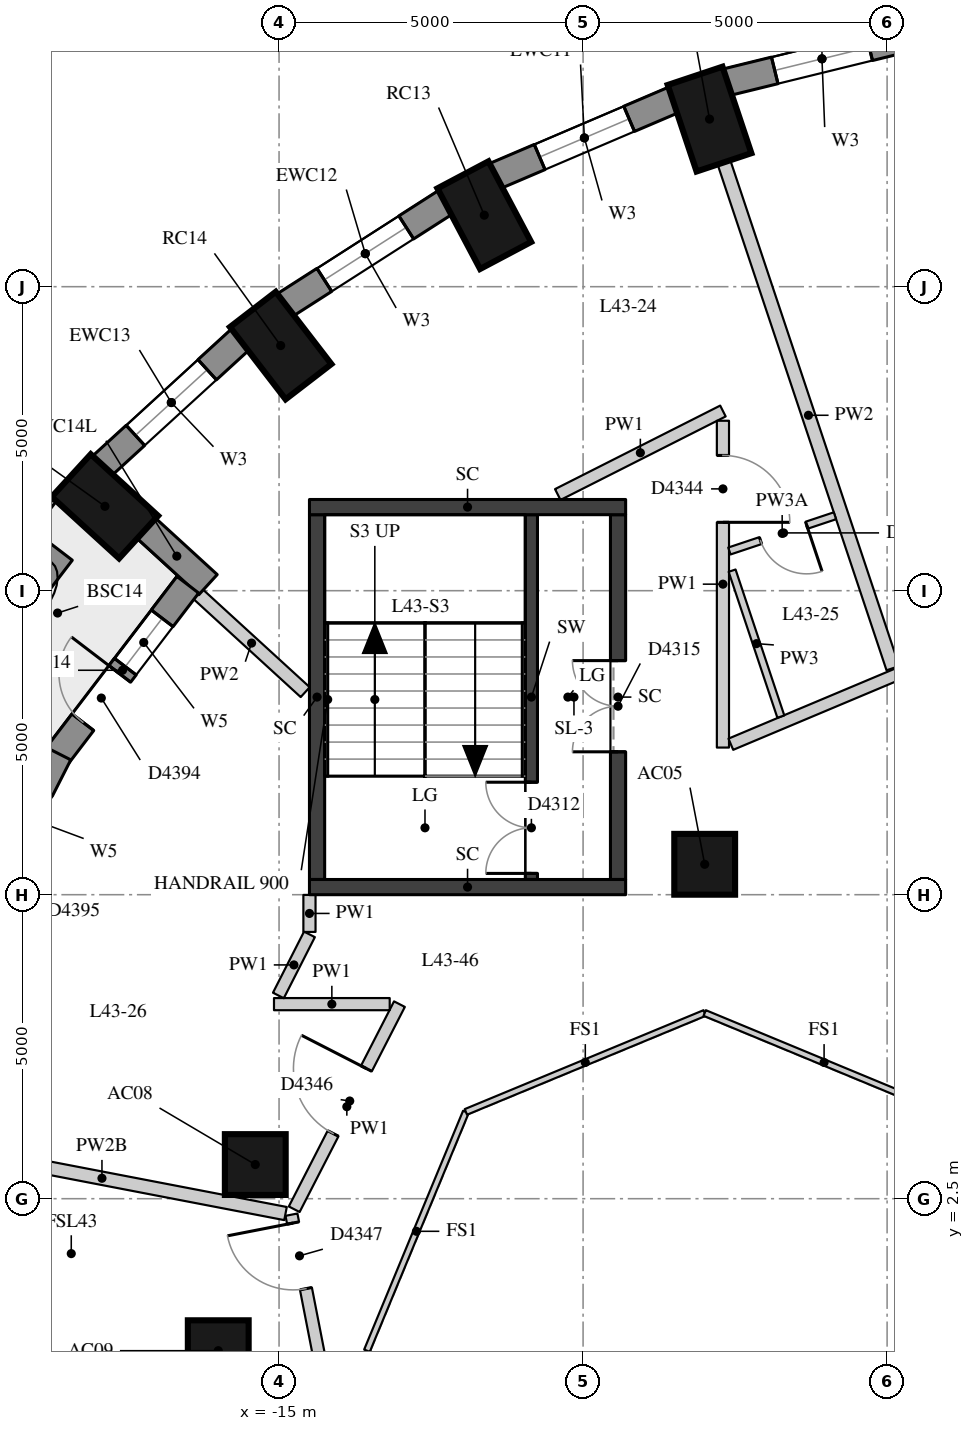
"""IFC4 building model, lengths in metres.
Left out: names, types, materials, properties, quantities, classifications, styles, units other than length and angle.
Written with IfcOpenShell. Run it as: python <this file> out.ifc"""

import sys

from ifc_helpers import new_model, si_unit, direction, frame, frame_2d, origin, origin_2d, place, context, subcontext, project, spatial, rectangle, extrude, element, fill, save


model = new_model("IFC4")
c1 = context("Model", 3, precision=1e-05, world=origin(), true_north=direction((0.0, 1.0)))
c2 = subcontext(c1, "Body", "Model", "MODEL_VIEW")
j1 = project(units=[si_unit("LENGTHUNIT", "METRE"), si_unit("PLANEANGLEUNIT", "RADIAN")], contexts=[c1])
p1 = place(None, origin())
s1 = spatial("IfcSite", under=j1, at=p1, CompositionType="ELEMENT")
p2 = place(p1, origin())
s2 = spatial("IfcBuilding", under=s1, at=p2, CompositionType="ELEMENT")
p3 = place(p2, frame((0.0, 0.0, 155.0)))
s3 = spatial("IfcBuildingStorey", under=s2, at=p3, CompositionType="ELEMENT", Elevation=155.0)
for number, where, z_axis, x_axis in (
    (1, (-7.92, 20.256, 0.0), (0.0, 0.0, 1.0), (-0.317, 0.949, 0.0)),
    (2, (-11.625, 18.676, 0.0), (0.0, 0.0, 1.0), (-0.468, 0.884, 0.0)),
    (3, (-14.973, 16.532, 0.0), (0.0, 0.0, 1.0), (-0.61, 0.792, 0.0)),
    (4, (-17.864, 13.888, 0.0), (0.0, 0.0, 1.0), (-0.738, 0.675, 0.0)),
):
    element("IfcColumn", number, at=place(p3, frame(where, z_axis=z_axis, x_axis=x_axis)), inside=s3, PredefinedType="COLUMN", context=c2, shape_type="SweptSolid", body=[
        extrude(rectangle(XDim=1.5, YDim=0.95, at=origin_2d()), origin(), (0.0, 0.0, 1.0), 3.3),
    ])
for number, where, z_axis, x_axis in (
    (5, (-8.0, 8.0, 0.0), (0.0, 0.0, 1.0), (1.0, 0.0, 0.0)),
    (6, (-15.391, 3.062, 0.0), (0.0, 0.0, 1.0), (1.0, 0.0, 0.0)),
    (7, (-16.0, 0.0, 0.0), (0.0, 0.0, 1.0), (1.0, 0.0, 0.0)),
):
    element("IfcColumn", number, at=place(p3, frame(where, z_axis=z_axis, x_axis=x_axis)), inside=s3, PredefinedType="COLUMN", context=c2, shape_type="SweptSolid", body=[
        extrude(rectangle(XDim=1.0, YDim=1.0, at=origin_2d()), origin(), (0.0, 0.0, 1.0), 3.3),
    ])
p4 = place(p3, frame((-4.499, 21.633, 0.0), z_axis=(0.0, 0.0, 1.0), x_axis=(-0.971232901476, -0.238131583563, 0.0)))
e8 = element("IfcWall", 8, at=p4, inside=s3, PredefinedType="SOLIDWALL", context=c2, shape_type="SweptSolid", body=[
    extrude(rectangle(XDim=3.237, YDim=0.45, at=frame_2d((1.618, 0.0))), origin(), (0.0, 0.0, 1.0), 3.02),
])
p5 = place(p4, frame((0.818, 0.0, 0.4)))
e9 = element("IfcOpeningElement", 9, at=p5, cuts=e8, PredefinedType="OPENING", context=c2, shape_type="SweptSolid", body=[
    extrude(rectangle(XDim=1.6, YDim=1.75, at=frame_2d((0.8, 0.875))), frame((0.0, 0.235, 0.0), z_axis=(0.0, -1.0, 0.0), x_axis=(1.0, 0.0, 0.0)), (0.0, 0.0, 1.0), 0.47),
])
p6 = place(p3, frame((-8.506, 20.574, 0.0), z_axis=(0.0, 0.0, 1.0), x_axis=(-0.919798725687, -0.392390499663, 0.0)))
e10 = element("IfcWall", 10, at=p6, inside=s3, PredefinedType="SOLIDWALL", context=c2, shape_type="SweptSolid", body=[
    extrude(rectangle(XDim=3.2, YDim=0.45, at=frame_2d((1.6, 0.0))), origin(), (0.0, 0.0, 1.0), 3.02),
])
p7 = place(p6, frame((0.8, 0.0, 0.4)))
e11 = element("IfcOpeningElement", 11, at=p7, cuts=e10, PredefinedType="OPENING", context=c2, shape_type="SweptSolid", body=[
    extrude(rectangle(XDim=1.6, YDim=1.75, at=frame_2d((0.8, 0.875))), frame((0.0, 0.235, 0.0), z_axis=(0.0, -1.0, 0.0), x_axis=(1.0, 0.0, 0.0)), (0.0, 0.0, 1.0), 0.47),
])
p8 = place(p3, frame((-12.255, 18.893, 0.0), z_axis=(0.0, 0.0, 1.0), x_axis=(-0.842030726237, -0.539429565442, 0.0)))
e12 = element("IfcWall", 12, at=p8, inside=s3, PredefinedType="SOLIDWALL", context=c2, shape_type="SweptSolid", body=[
    extrude(rectangle(XDim=3.151, YDim=0.45, at=frame_2d((1.576, 0.0))), origin(), (0.0, 0.0, 1.0), 3.02),
])
p9 = place(p8, frame((0.776, 0.0, 0.4)))
e13 = element("IfcOpeningElement", 13, at=p9, cuts=e12, PredefinedType="OPENING", context=c2, shape_type="SweptSolid", body=[
    extrude(rectangle(XDim=1.6, YDim=1.75, at=frame_2d((0.8, 0.875))), frame((0.0, 0.235, 0.0), z_axis=(0.0, -1.0, 0.0), x_axis=(1.0, 0.0, 0.0)), (0.0, 0.0, 1.0), 0.47),
])
p10 = place(p3, frame((-15.63, 16.639, 0.0), z_axis=(0.0, 0.0, 1.0), x_axis=(-0.737808755941, -0.675009807082, 0.0)))
e14 = element("IfcWall", 14, at=p10, inside=s3, PredefinedType="SOLIDWALL", context=c2, shape_type="SweptSolid", body=[
    extrude(rectangle(XDim=3.094, YDim=0.45, at=frame_2d((1.547, 0.0))), origin(), (0.0, 0.0, 1.0), 3.02),
])
p11 = place(p10, frame((0.747, 0.0, 0.4)))
e15 = element("IfcOpeningElement", 15, at=p11, cuts=e14, PredefinedType="OPENING", context=c2, shape_type="SweptSolid", body=[
    extrude(rectangle(XDim=1.6, YDim=1.75, at=frame_2d((0.8, 0.875))), frame((0.0, 0.235, 0.0), z_axis=(0.0, -1.0, 0.0), x_axis=(1.0, 0.0, 0.0)), (0.0, 0.0, 1.0), 0.47),
])
p12 = place(p3, frame((-17.195, 13.537, 0.0), z_axis=(0.0, 0.0, 1.0), x_axis=(0.737918885826, -0.674889411638, 0.0)))
e16 = element("IfcWall", 16, at=p12, inside=s3, PredefinedType="SOLIDWALL", context=c2, shape_type="SweptSolid", body=[
    extrude(rectangle(XDim=1.391, YDim=0.45, at=frame_2d((0.695, 0.0))), origin(), (0.0, 0.0, 1.0), 3.02),
])
p13 = place(p3, frame((-16.501, 12.598, 0.0), z_axis=(0.0, 0.0, 1.0), x_axis=(-0.606778881252, -0.794870674554, 0.0)))
e17 = element("IfcWall", 17, at=p13, inside=s3, PredefinedType="SOLIDWALL", context=c2, shape_type="SweptSolid", body=[
    extrude(rectangle(XDim=3.538, YDim=0.45, at=frame_2d((1.769, 0.0))), origin(), (0.0, 0.0, 1.0), 3.02),
])
p14 = place(p13, frame((0.694, 0.0, 0.4)))
e18 = element("IfcOpeningElement", 18, at=p14, cuts=e17, PredefinedType="OPENING", context=c2, shape_type="SweptSolid", body=[
    extrude(rectangle(XDim=1.0, YDim=1.75, at=frame_2d((0.5, 0.875))), frame((0.0, 0.235, 0.0), z_axis=(0.0, -1.0, 0.0), x_axis=(1.0, 0.0, 0.0)), (0.0, 0.0, 1.0), 0.47),
])
p15 = place(p13, frame((1.844, 0.0, 0.0)))
e19 = element("IfcOpeningElement", 19, at=p15, cuts=e17, PredefinedType="OPENING", context=c2, shape_type="SweptSolid", body=[
    extrude(rectangle(XDim=1.0, YDim=2.15, at=frame_2d((0.5, 1.075))), frame((0.0, 0.235, 0.0), z_axis=(0.0, -1.0, 0.0), x_axis=(1.0, 0.0, 0.0)), (0.0, 0.0, 1.0), 0.47),
])
p16 = place(p3, frame((-18.626, 9.82, 0.0), z_axis=(0.0, 0.0, 1.0), x_axis=(-0.453241970186, -0.891387523169, 0.0)))
e20 = element("IfcWall", 20, at=p16, inside=s3, PredefinedType="SOLIDWALL", context=c2, shape_type="SweptSolid", body=[
    extrude(rectangle(XDim=3.493, YDim=0.45, at=frame_2d((1.747, 0.0))), origin(), (0.0, 0.0, 1.0), 3.02),
])
p17 = place(p16, frame((0.672, 0.0, 0.4)))
e21 = element("IfcOpeningElement", 21, at=p17, cuts=e20, PredefinedType="OPENING", context=c2, shape_type="SweptSolid", body=[
    extrude(rectangle(XDim=1.0, YDim=1.75, at=frame_2d((0.5, 0.875))), frame((0.0, 0.235, 0.0), z_axis=(0.0, -1.0, 0.0), x_axis=(1.0, 0.0, 0.0)), (0.0, 0.0, 1.0), 0.47),
])
p18 = place(p16, frame((1.822, 0.0, 0.0)))
e22 = element("IfcOpeningElement", 22, at=p18, cuts=e20, PredefinedType="OPENING", context=c2, shape_type="SweptSolid", body=[
    extrude(rectangle(XDim=1.0, YDim=2.15, at=frame_2d((0.5, 1.075))), frame((0.0, 0.235, 0.0), z_axis=(0.0, -1.0, 0.0), x_axis=(1.0, 0.0, 0.0)), (0.0, 0.0, 1.0), 0.47),
])
p19 = place(p3, frame((-18.678, 13.214, 0.0), z_axis=(0.0, 0.0, 1.0), x_axis=(-0.607762189494, -0.794119084912, 0.0)))
e23 = element("IfcWall", 23, at=p19, inside=s3, PredefinedType="USERDEFINED", context=c2, shape_type="SweptSolid", body=[
    extrude(rectangle(XDim=1.8, YDim=0.7, at=frame_2d((0.9, 0.0))), origin(), (0.0, 0.0, 1.0), 0.75),
])
p20 = place(p3, frame((-10.85, 7.75, 0.0), z_axis=(0.0, 0.0, 1.0), x_axis=(0.0, 1.0, 0.0)))
e24 = element("IfcWall", 24, at=p20, inside=s3, PredefinedType="SHEAR", context=c2, shape_type="SweptSolid", body=[
    extrude(rectangle(XDim=6.0, YDim=0.2, at=frame_2d((3.0, 0.0))), origin(), (0.0, 0.0, 1.0), 3.02),
])
p21 = place(p20, frame((0.1, 0.0, 0.0)))
e25 = element("IfcOpeningElement", 25, at=p21, cuts=e24, PredefinedType="OPENING", context=c2, shape_type="SweptSolid", body=[
    extrude(rectangle(XDim=1.5, YDim=2.1, at=frame_2d((0.75, 1.05))), frame((0.0, 0.11, 0.0), z_axis=(0.0, -1.0, 0.0), x_axis=(1.0, 0.0, 0.0)), (0.0, 0.0, 1.0), 0.22),
])
p22 = place(p3, frame((-14.375, 7.75, -0.28), z_axis=(0.0, 0.0, 1.0), x_axis=(0.0, 1.0, 0.0)))
e26 = element("IfcWall", 26, at=p22, inside=s3, PredefinedType="SHEAR", context=c2, shape_type="SweptSolid", body=[
    extrude(rectangle(XDim=6.0, YDim=0.25, at=frame_2d((3.0, 0.0))), origin(), (0.0, 0.0, 1.0), 3.3),
])
p23 = place(p3, frame((-9.425, 7.75, -0.28), z_axis=(0.0, 0.0, 1.0), x_axis=(0.0, 1.0, 0.0)))
e27 = element("IfcWall", 27, at=p23, inside=s3, PredefinedType="SHEAR", context=c2, shape_type="SweptSolid", body=[
    extrude(rectangle(XDim=6.0, YDim=0.25, at=frame_2d((3.0, 0.0))), origin(), (0.0, 0.0, 1.0), 3.3),
])
p24 = place(p23, frame((2.1, 0.0, 0.28)))
e28 = element("IfcOpeningElement", 28, at=p24, cuts=e27, PredefinedType="OPENING", context=c2, shape_type="SweptSolid", body=[
    extrude(rectangle(XDim=1.5, YDim=2.1, at=frame_2d((0.75, 1.05))), frame((0.0, 0.135, 0.0), z_axis=(0.0, -1.0, 0.0), x_axis=(1.0, 0.0, 0.0)), (0.0, 0.0, 1.0), 0.27),
])
for number, where, z_axis, x_axis in (
    (29, (-14.5, 13.875, -0.28), (0.0, 0.0, 1.0), (1.0, 0.0, 0.0)),
    (30, (-14.5, 7.625, -0.28), (0.0, 0.0, 1.0), (1.0, 0.0, 0.0)),
):
    element("IfcWall", number, at=place(p3, frame(where, z_axis=z_axis, x_axis=x_axis)), inside=s3, PredefinedType="SHEAR", context=c2, shape_type="SweptSolid", body=[
        extrude(rectangle(XDim=5.2, YDim=0.25, at=frame_2d((2.6, 0.0))), origin(), (0.0, 0.0, 1.0), 3.3),
    ])
p25 = place(p3, frame((-13.268, -5.583, 0.0), z_axis=(0.0, 0.0, 1.0), x_axis=(-0.191747927029, 0.981444207523, 0.0)))
e31 = element("IfcWall", 31, at=p25, inside=s3, PredefinedType="PARTITIONING", context=c2, shape_type="SweptSolid", body=[
    extrude(rectangle(XDim=7.968, YDim=0.2, at=frame_2d((3.984, 0.0))), origin(), (0.0, 0.0, 1.0), 3.02),
])
p26 = place(p25, frame((6.728, 0.0, 0.0)))
e32 = element("IfcOpeningElement", 32, at=p26, cuts=e31, PredefinedType="OPENING", context=c2, shape_type="SweptSolid", body=[
    extrude(rectangle(XDim=1.1, YDim=2.1, at=frame_2d((0.55, 1.05))), frame((0.0, 0.11, 0.0), z_axis=(0.0, -1.0, 0.0), x_axis=(1.0, 0.0, 0.0)), (0.0, 0.0, 1.0), 0.22),
])
p27 = place(p3, frame((-14.751, 2.326, 0.0), z_axis=(0.0, 0.0, 1.0), x_axis=(0.456461745611, 0.889743038632, 0.0)))
e33 = element("IfcWall", 33, at=p27, inside=s3, PredefinedType="PARTITIONING", context=c2, shape_type="SweptSolid", body=[
    extrude(rectangle(XDim=3.792, YDim=0.2, at=frame_2d((1.896, 0.0))), origin(), (0.0, 0.0, 1.0), 3.02),
])
p28 = place(p27, frame((1.401, 0.0, 0.0)))
e34 = element("IfcOpeningElement", 34, at=p28, cuts=e33, PredefinedType="OPENING", context=c2, shape_type="SweptSolid", body=[
    extrude(rectangle(XDim=1.2, YDim=2.1, at=frame_2d((0.6, 1.05))), frame((0.0, 0.11, 0.0), z_axis=(0.0, -1.0, 0.0), x_axis=(1.0, 0.0, 0.0)), (0.0, 0.0, 1.0), 0.22),
])
p29 = place(p3, frame((-13.18, 5.7, 0.0), z_axis=(0.0, 0.0, 1.0), x_axis=(-1.0, 0.0, 0.0)))
e35 = element("IfcWall", 35, at=p29, inside=s3, PredefinedType="PARTITIONING", context=c2, shape_type="SweptSolid", body=[
    extrude(rectangle(XDim=1.903, YDim=0.2, at=frame_2d((0.952, 0.0))), origin(), (0.0, 0.0, 1.0), 3.02),
])
p30 = place(p3, frame((-15.011, 5.843, 0.0), z_axis=(0.0, 0.0, 1.0), x_axis=(0.453267091839, 0.891374749169, 0.0)))
e36 = element("IfcWall", 36, at=p30, inside=s3, PredefinedType="PARTITIONING", context=c2, shape_type="SweptSolid", body=[
    extrude(rectangle(XDim=1.127, YDim=0.2, at=frame_2d((0.564, 0.0))), origin(), (0.0, 0.0, 1.0), 3.02),
])
p31 = place(p3, frame((-14.5, 6.887, 0.0), z_axis=(0.0, 0.0, 1.0), x_axis=(0.0, 1.0, 0.0)))
e37 = element("IfcWall", 37, at=p31, inside=s3, PredefinedType="PARTITIONING", context=c2, shape_type="SweptSolid", body=[
    extrude(rectangle(XDim=0.609, YDim=0.2, at=frame_2d((0.304, 0.0))), origin(), (0.0, 0.0, 1.0), 3.02),
])
p32 = place(p3, frame((-10.416, 14.082, 0.0), z_axis=(0.0, 0.0, 1.0), x_axis=(0.892396808139, 0.451251522793, 0.0)))
e38 = element("IfcWall", 38, at=p32, inside=s3, PredefinedType="PARTITIONING", context=c2, shape_type="SweptSolid", body=[
    extrude(rectangle(XDim=3.044, YDim=0.2, at=frame_2d((1.522, 0.0))), origin(), (0.0, 0.0, 1.0), 3.02),
])
p33 = place(p3, frame((-7.7, 15.295, 0.0), z_axis=(0.0, 0.0, 1.0), x_axis=(0.0, -1.0, 0.0)))
e39 = element("IfcWall", 39, at=p33, inside=s3, PredefinedType="PARTITIONING", context=c2, shape_type="SweptSolid", body=[
    extrude(rectangle(XDim=5.375, YDim=0.2, at=frame_2d((2.688, 0.0))), origin(), (0.0, 0.0, 1.0), 3.02),
])
p34 = place(p33, frame((0.57, 0.0, 0.0)))
e40 = element("IfcOpeningElement", 40, at=p34, cuts=e39, PredefinedType="OPENING", context=c2, shape_type="SweptSolid", body=[
    extrude(rectangle(XDim=1.1, YDim=2.1, at=frame_2d((0.55, 1.05))), frame((0.0, 0.11, 0.0), z_axis=(0.0, -1.0, 0.0), x_axis=(1.0, 0.0, 0.0)), (0.0, 0.0, 1.0), 0.22),
])
p35 = place(p3, frame((-7.57, 9.975, 0.0), z_axis=(0.0, 0.0, 1.0), x_axis=(0.921815879705, 0.387628022624, 0.0)))
e41 = element("IfcWall", 41, at=p35, inside=s3, PredefinedType="PARTITIONING", context=c2, shape_type="SweptSolid", body=[
    extrude(rectangle(XDim=8.321, YDim=0.2, at=frame_2d((4.16, 0.0))), origin(), (0.0, 0.0, 1.0), 3.02),
])
p36 = place(p35, frame((4.721, 0.0, 0.0)))
e42 = element("IfcOpeningElement", 42, at=p36, cuts=e41, PredefinedType="OPENING", context=c2, shape_type="SweptSolid", body=[
    extrude(rectangle(XDim=1.8, YDim=2.1, at=frame_2d((0.9, 1.05))), frame((0.0, 0.11, 0.0), z_axis=(0.0, -1.0, 0.0), x_axis=(1.0, 0.0, 0.0)), (0.0, 0.0, 1.0), 0.22),
])
p37 = place(p3, frame((-7.683, 19.545, 0.0), z_axis=(0.0, 0.0, 1.0), x_axis=(0.316703700313, -0.948524520615, 0.0)))
e43 = element("IfcWall", 43, at=p37, inside=s3, PredefinedType="PARTITIONING", context=c2, shape_type="SweptSolid", body=[
    extrude(rectangle(XDim=8.771, YDim=0.22, at=frame_2d((4.385, 0.0))), origin(), (0.0, 0.0, 1.0), 3.02),
])
p38 = place(p3, frame((-16.334, 12.445, 0.0), z_axis=(0.0, 0.0, 1.0), x_axis=(0.737857346278, -0.674956692347, 0.0)))
e44 = element("IfcWall", 44, at=p38, inside=s3, PredefinedType="PARTITIONING", context=c2, shape_type="SweptSolid", body=[
    extrude(rectangle(XDim=2.391, YDim=0.22, at=frame_2d((1.195, 0.0))), origin(), (0.0, 0.0, 1.0), 3.02),
])
p39 = place(p3, frame((-20.932, 3.417, 0.0), z_axis=(0.0, 0.0, 1.0), x_axis=(0.9820075798, -0.188841502892, 0.0)))
e45 = element("IfcWall", 45, at=p39, inside=s3, PredefinedType="PARTITIONING", context=c2, shape_type="SweptSolid", body=[
    extrude(rectangle(XDim=6.149, YDim=0.22, at=frame_2d((3.074, 0.0))), origin(), (0.0, 0.0, 1.0), 2.57),
])
p40 = place(p3, frame((-6.748, 10.429, 0.0), z_axis=(0.0, 0.0, 1.0), x_axis=(-0.316690754737, 0.948528842927, 0.0)))
e46 = element("IfcWall", 46, at=p40, inside=s3, PredefinedType="PARTITIONING", context=c2, shape_type="SweptSolid", body=[
    extrude(rectangle(XDim=2.531, YDim=0.12, at=frame_2d((1.266, 0.0))), origin(), (0.0, 0.0, 1.0), 3.02),
])
p41 = place(p3, frame((-7.594, 13.153, 0.0), z_axis=(0.0, 0.0, 1.0), x_axis=(0.948563158378, 0.316587957079, 0.0)))
e47 = element("IfcWall", 47, at=p41, inside=s3, PredefinedType="PARTITIONING", context=c2, shape_type="SweptSolid", body=[
    extrude(rectangle(XDim=1.83, YDim=0.12, at=frame_2d((0.915, 0.0))), origin(), (0.0, 0.0, 1.0), 2.57),
])
p42 = place(p41, frame((0.54, 0.0, 0.0)))
e48 = element("IfcOpeningElement", 48, at=p42, cuts=e47, PredefinedType="OPENING", context=c2, shape_type="SweptSolid", body=[
    extrude(rectangle(XDim=0.8, YDim=2.1, at=frame_2d((0.4, 1.05))), frame((0.0, 0.07, 0.0), z_axis=(0.0, -1.0, 0.0), x_axis=(1.0, 0.0, 0.0)), (0.0, 0.0, 1.0), 0.14),
])
for number, where, z_axis, x_axis in (
    (49, (-11.927, -3.927, 0.0), (0.0, 0.0, 1.0), (-0.383, 0.924, 0.0)),
    (50, (-13.554, 0.0, 0.0), (0.0, 0.0, 1.0), (0.383, 0.924, 0.0)),
    (51, (-11.927, 3.927, 0.0), (0.0, 0.0, 1.0), (0.924, 0.383, 0.0)),
    (52, (-8.0, 5.554, 0.0), (0.0, 0.0, 1.0), (0.924, -0.383, 0.0)),
):
    element("IfcWall", number, at=place(p3, frame(where, z_axis=z_axis, x_axis=x_axis)), inside=s3, PredefinedType="PARTITIONING", context=c2, shape_type="SweptSolid", body=[
        extrude(rectangle(XDim=4.251, YDim=0.1, at=frame_2d((2.125, 0.0))), origin(), (0.0, 0.0, 1.0), 3.02),
    ])
p43 = place(p5, origin())
e53 = element("IfcWindow", 53, at=p43, inside=s3, PartitioningType="SINGLE_PANEL", PredefinedType="WINDOW", context=c2, shape_type="SweptSolid", body=[
    extrude(rectangle(XDim=1.6, YDim=1.75, at=frame_2d((0.8, 0.875))), frame((0.0, 0.035, 0.0), z_axis=(0.0, -1.0, 0.0), x_axis=(1.0, 0.0, 0.0)), (0.0, 0.0, 1.0), 0.06),
])
fill(e9, e53)
p44 = place(p7, origin())
e54 = element("IfcWindow", 54, at=p44, inside=s3, PartitioningType="SINGLE_PANEL", PredefinedType="WINDOW", context=c2, shape_type="SweptSolid", body=[
    extrude(rectangle(XDim=1.6, YDim=1.75, at=frame_2d((0.8, 0.875))), frame((0.0, 0.035, 0.0), z_axis=(0.0, -1.0, 0.0), x_axis=(1.0, 0.0, 0.0)), (0.0, 0.0, 1.0), 0.06),
])
fill(e11, e54)
p45 = place(p9, origin())
e55 = element("IfcWindow", 55, at=p45, inside=s3, PartitioningType="SINGLE_PANEL", PredefinedType="WINDOW", context=c2, shape_type="SweptSolid", body=[
    extrude(rectangle(XDim=1.6, YDim=1.75, at=frame_2d((0.8, 0.875))), frame((0.0, 0.035, 0.0), z_axis=(0.0, -1.0, 0.0), x_axis=(1.0, 0.0, 0.0)), (0.0, 0.0, 1.0), 0.06),
])
fill(e13, e55)
p46 = place(p11, origin())
e56 = element("IfcWindow", 56, at=p46, inside=s3, PartitioningType="SINGLE_PANEL", PredefinedType="WINDOW", context=c2, shape_type="SweptSolid", body=[
    extrude(rectangle(XDim=1.6, YDim=1.75, at=frame_2d((0.8, 0.875))), frame((0.0, 0.035, 0.0), z_axis=(0.0, -1.0, 0.0), x_axis=(1.0, 0.0, 0.0)), (0.0, 0.0, 1.0), 0.06),
])
fill(e15, e56)
p47 = place(p14, origin())
e57 = element("IfcWindow", 57, at=p47, inside=s3, PartitioningType="SINGLE_PANEL", PredefinedType="WINDOW", context=c2, shape_type="SweptSolid", body=[
    extrude(rectangle(XDim=1.0, YDim=1.75, at=frame_2d((0.5, 0.875))), frame((0.0, 0.035, 0.0), z_axis=(0.0, -1.0, 0.0), x_axis=(1.0, 0.0, 0.0)), (0.0, 0.0, 1.0), 0.06),
])
fill(e18, e57)
p48 = place(p15, frame((1.0, 0.0, 0.0), z_axis=(0.0, 0.0, 1.0), x_axis=(-1.0, 0.0, 0.0)))
e58 = element("IfcDoor", 58, at=p48, inside=s3, OperationType="SINGLE_SWING_RIGHT", PredefinedType="DOOR", context=c2, shape_type="SweptSolid", body=[
    extrude(rectangle(XDim=1.0, YDim=2.15, at=frame_2d((0.5, 1.075))), frame((0.0, 0.075, 0.0), z_axis=(0.0, -1.0, 0.0), x_axis=(1.0, 0.0, 0.0)), (0.0, 0.0, 1.0), 0.05),
])
fill(e19, e58)
p49 = place(p21, origin())
e59 = element("IfcDoor", 59, at=p49, inside=s3, OperationType="DOUBLE_DOOR_SINGLE_SWING", PredefinedType="DOOR", context=c2, shape_type="SweptSolid", body=[
    extrude(rectangle(XDim=1.5, YDim=2.1, at=frame_2d((0.75, 1.05))), frame((0.0, 0.025, 0.0), z_axis=(0.0, -1.0, 0.0), x_axis=(1.0, 0.0, 0.0)), (0.0, 0.0, 1.0), 0.05),
])
fill(e25, e59)
p50 = place(p24, origin())
e60 = element("IfcDoor", 60, at=p50, inside=s3, OperationType="DOUBLE_DOOR_SINGLE_SWING", PredefinedType="DOOR", context=c2, shape_type="SweptSolid", body=[
    extrude(rectangle(XDim=1.5, YDim=2.1, at=frame_2d((0.75, 1.05))), frame((0.0, 0.025, 0.0), z_axis=(0.0, -1.0, 0.0), x_axis=(1.0, 0.0, 0.0)), (0.0, 0.0, 1.0), 0.05),
])
fill(e28, e60)
p51 = place(p34, origin())
e61 = element("IfcDoor", 61, at=p51, inside=s3, OperationType="SINGLE_SWING_RIGHT", PredefinedType="DOOR", context=c2, shape_type="SweptSolid", body=[
    extrude(rectangle(XDim=1.1, YDim=2.1, at=frame_2d((0.55, 1.05))), frame((0.0, 0.025, 0.0), z_axis=(0.0, -1.0, 0.0), x_axis=(1.0, 0.0, 0.0)), (0.0, 0.0, 1.0), 0.05),
])
fill(e40, e61)
p52 = place(p42, origin())
e62 = element("IfcDoor", 62, at=p52, inside=s3, OperationType="SINGLE_SWING_LEFT", PredefinedType="DOOR", context=c2, shape_type="SweptSolid", body=[
    extrude(rectangle(XDim=0.8, YDim=2.1, at=frame_2d((0.4, 1.05))), frame((0.0, 0.025, 0.0), z_axis=(0.0, -1.0, 0.0), x_axis=(1.0, 0.0, 0.0)), (0.0, 0.0, 1.0), 0.05),
])
fill(e48, e62)
p53 = place(p28, origin())
e63 = element("IfcDoor", 63, at=p53, inside=s3, OperationType="SINGLE_SWING_RIGHT", PredefinedType="DOOR", context=c2, shape_type="SweptSolid", body=[
    extrude(rectangle(XDim=1.2, YDim=2.1, at=frame_2d((0.6, 1.05))), frame((0.0, 0.025, 0.0), z_axis=(0.0, -1.0, 0.0), x_axis=(1.0, 0.0, 0.0)), (0.0, 0.0, 1.0), 0.05),
])
fill(e34, e63)
p54 = place(p26, origin())
e64 = element("IfcDoor", 64, at=p54, inside=s3, OperationType="SINGLE_SWING_RIGHT", PredefinedType="DOOR", context=c2, shape_type="SweptSolid", body=[
    extrude(rectangle(XDim=1.1, YDim=2.1, at=frame_2d((0.55, 1.05))), frame((0.0, 0.025, 0.0), z_axis=(0.0, -1.0, 0.0), x_axis=(1.0, 0.0, 0.0)), (0.0, 0.0, 1.0), 0.05),
])
fill(e32, e64)
save(model, sys.argv[1])
